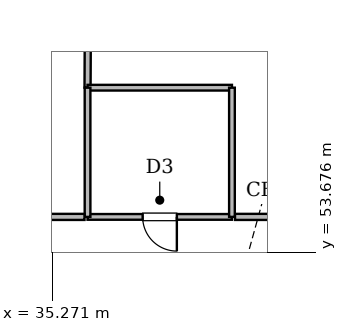
"""IFC4 building model, lengths in metres.
Left out: names, types, materials, properties, quantities, classifications, styles, units other than length and angle.
Written with IfcOpenShell. Run it as: python <this file> out.ifc"""

import sys

from ifc_helpers import new_model, si_unit, direction, frame, frame_2d, origin, place, context, subcontext, project, spatial, rectangle, extrude, element, fill, save


model = new_model("IFC4")
c1 = context("Model", 3, precision=1e-05, world=origin(), true_north=direction((0.0, 1.0)))
c2 = subcontext(c1, "Body", "Model", "MODEL_VIEW")
j1 = project(units=[si_unit("LENGTHUNIT", "METRE"), si_unit("PLANEANGLEUNIT", "RADIAN")], contexts=[c1])
p1 = place(None, origin())
s1 = spatial("IfcSite", under=j1, at=p1, CompositionType="ELEMENT")
p2 = place(p1, origin())
s2 = spatial("IfcBuilding", under=s1, at=p2, CompositionType="ELEMENT")
p3 = place(p2, frame((0.0, 0.0, 9.6)))
s3 = spatial("IfcBuildingStorey", under=s2, at=p3, CompositionType="ELEMENT", Elevation=9.6)
p4 = place(p3, frame((40.0, 54.6, 0.0), z_axis=(0.0, 0.0, 1.0), x_axis=(-1.0, 0.0, 0.0)))
e1 = element("IfcWall", 1, at=p4, inside=s3, PredefinedType="PLUMBINGWALL", context=c2, shape_type="SweptSolid", body=[
    extrude(rectangle(XDim=3.8, YDim=0.15, at=frame_2d((1.9, 0.0))), origin(), (0.0, 0.0, 1.0), 3.588),
])
p5 = place(p4, frame((1.45, 0.0, 0.0)))
e2 = element("IfcOpeningElement", 2, at=p5, cuts=e1, PredefinedType="OPENING", context=c2, shape_type="SweptSolid", body=[
    extrude(rectangle(XDim=0.9, YDim=2.1, at=frame_2d((0.45, 1.05))), frame((0.0, 0.085, 0.0), z_axis=(0.0, -1.0, 0.0), x_axis=(1.0, 0.0, 0.0)), (0.0, 0.0, 1.0), 0.17),
])
p6 = place(p3, frame((36.2, 58.0, 0.0), z_axis=(0.0, 0.0, 1.0), x_axis=(0.00502818965, 0.999987358575, 0.0)))
e3 = element("IfcWall", 3, at=p6, inside=s3, PredefinedType="SOLIDWALL", context=c2, shape_type="SweptSolid", body=[
    extrude(rectangle(XDim=14.906, YDim=0.16, at=frame_2d((7.453, 0.0))), origin(), (0.0, 0.0, 1.0), 3.788),
])
p7 = place(p3, frame((52.47, 54.6, 0.0), z_axis=(0.0, 0.0, 1.0), x_axis=(-1.0, 0.0, 0.0)))
e4 = element("IfcWall", 4, at=p7, inside=s3, PredefinedType="SOLIDWALL", context=c2, shape_type="SweptSolid", body=[
    extrude(rectangle(XDim=12.39, YDim=0.16, at=frame_2d((6.195, 0.0))), origin(), (0.0, 0.0, 1.0), 3.588),
])
p8 = place(p3, frame((40.0, 58.0, 0.0), z_axis=(0.0, 0.0, 1.0), x_axis=(-1.0, 0.0, 0.0)))
e5 = element("IfcWall", 5, at=p8, inside=s3, PredefinedType="PLUMBINGWALL", context=c2, shape_type="SweptSolid", body=[
    extrude(rectangle(XDim=3.8, YDim=0.15, at=frame_2d((1.9, 0.0))), origin(), (0.0, 0.0, 1.0), 4.5),
])
p9 = place(p3, frame((36.2, 58.0, 0.0), z_axis=(0.0, 0.0, 1.0), x_axis=(0.0, -1.0, 0.0)))
e6 = element("IfcWall", 6, at=p9, inside=s3, PredefinedType="PLUMBINGWALL", context=c2, shape_type="SweptSolid", body=[
    extrude(rectangle(XDim=3.4, YDim=0.15, at=frame_2d((1.7, 0.0))), origin(), (0.0, 0.0, 1.0), 4.5),
])
p10 = place(p3, frame((40.0, 54.6, 0.0), z_axis=(0.0, 0.0, 1.0), x_axis=(0.0, 1.0, 0.0)))
e7 = element("IfcWall", 7, at=p10, inside=s3, PredefinedType="PLUMBINGWALL", context=c2, shape_type="SweptSolid", body=[
    extrude(rectangle(XDim=3.4, YDim=0.15, at=frame_2d((1.7, 0.0))), origin(), (0.0, 0.0, 1.0), 3.588),
])
p11 = place(p3, frame((36.12, 54.6, 0.0), z_axis=(0.0, 0.0, 1.0), x_axis=(-1.0, 0.0, 0.0)))
e8 = element("IfcWall", 8, at=p11, inside=s3, PredefinedType="SOLIDWALL", context=c2, shape_type="SweptSolid", body=[
    extrude(rectangle(XDim=2.64, YDim=0.16, at=frame_2d((1.32, 0.0))), origin(), (0.0, 0.0, 1.0), 4.5),
])
p12 = place(p5, origin())
e9 = element("IfcDoor", 9, at=p12, inside=s3, OperationType="SINGLE_SWING_LEFT", PredefinedType="DOOR", context=c2, shape_type="SweptSolid", body=[
    extrude(rectangle(XDim=0.9, YDim=2.1, at=frame_2d((0.45, 1.05))), frame((0.0, 0.025, 0.0), z_axis=(0.0, -1.0, 0.0), x_axis=(1.0, 0.0, 0.0)), (0.0, 0.0, 1.0), 0.05),
])
fill(e2, e9)
save(model, sys.argv[1])
